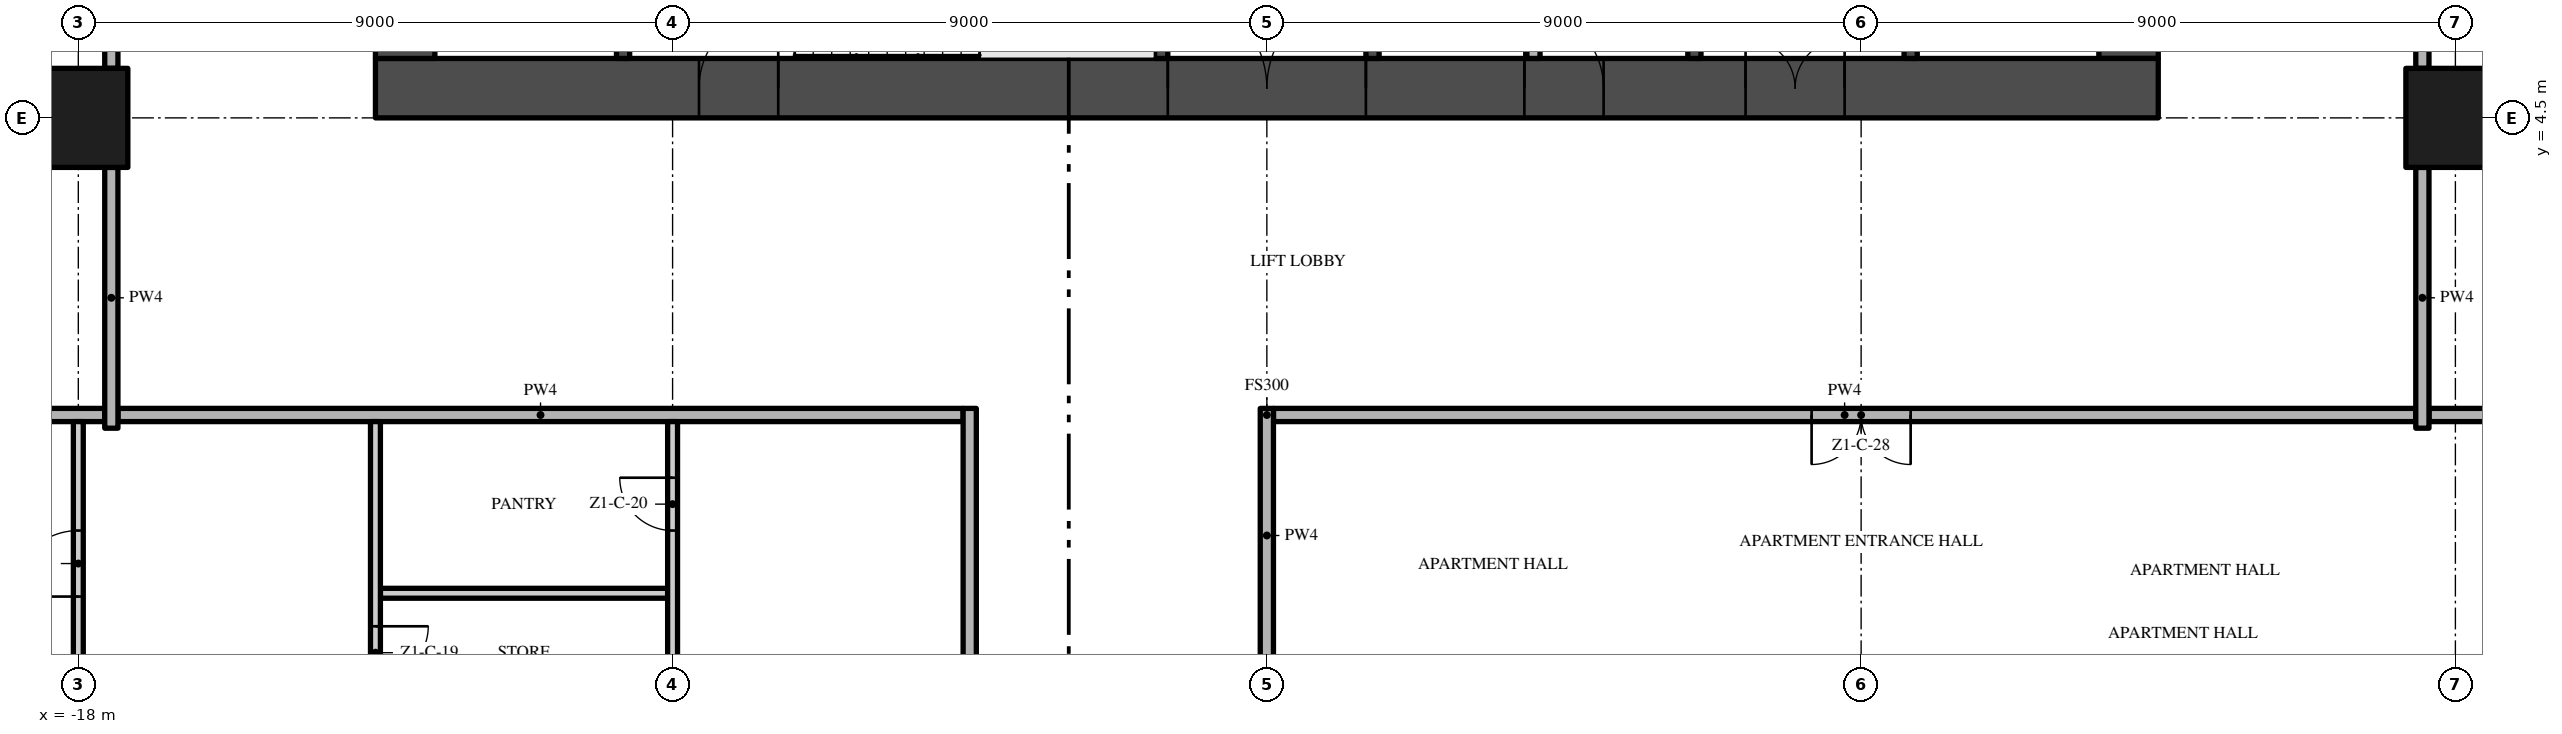
"""IFC4 building model, lengths in metres.
Left out: names, types, materials, properties, quantities, classifications, styles, units other than length and angle.
Written with IfcOpenShell. Run it as: python <this file> out.ifc"""

import sys

from ifc_helpers import new_model, si_unit, direction, frame, frame_2d, origin, origin_2d, place, context, subcontext, project, spatial, rectangle, extrude, element, fill, save


model = new_model("IFC4")
c1 = context("Model", 3, precision=1e-05, world=origin(), true_north=direction((0.0, 1.0)))
c2 = subcontext(c1, "Body", "Model", "MODEL_VIEW")
j1 = project(units=[si_unit("LENGTHUNIT", "METRE"), si_unit("PLANEANGLEUNIT", "RADIAN")], contexts=[c1])
p1 = place(None, origin())
s1 = spatial("IfcSite", under=j1, at=p1, CompositionType="ELEMENT")
p2 = place(p1, origin())
s2 = spatial("IfcBuilding", under=s1, at=p2, CompositionType="ELEMENT")
p3 = place(p2, frame((0.0, 0.0, 41.6)))
s3 = spatial("IfcBuildingStorey", under=s2, at=p3, CompositionType="ELEMENT", Elevation=41.6)
p4 = place(p3, frame((-13.5, 4.95, -0.3), z_axis=(0.0, 0.0, 1.0), x_axis=(1.0, 0.0, 0.0)))
e1 = element("IfcWall", 1, at=p4, inside=s3, PredefinedType="SHEAR", context=c2, shape_type="SweptSolid", body=[
    extrude(rectangle(XDim=27.0, YDim=0.9, at=frame_2d((13.5, 0.0))), origin(), (0.0, 0.0, 1.0), 3.8),
])
p5 = place(p4, frame((12.0, 0.0, 0.3)))
e2 = element("IfcOpeningElement", 2, at=p5, cuts=e1, PredefinedType="OPENING", context=c2, shape_type="SweptSolid", body=[
    extrude(rectangle(XDim=3.0, YDim=2.4, at=frame_2d((1.5, 1.2))), frame((0.0, 0.46, 0.0), z_axis=(0.0, -1.0, 0.0), x_axis=(1.0, 0.0, 0.0)), (0.0, 0.0, 1.0), 0.92),
])
p6 = place(p4, frame((4.9, 0.0, 0.3)))
e3 = element("IfcOpeningElement", 3, at=p6, cuts=e1, PredefinedType="OPENING", context=c2, shape_type="SweptSolid", body=[
    extrude(rectangle(XDim=1.2, YDim=2.2, at=frame_2d((0.6, 1.1))), frame((0.0, 0.46, 0.0), z_axis=(0.0, -1.0, 0.0), x_axis=(1.0, 0.0, 0.0)), (0.0, 0.0, 1.0), 0.92),
])
p7 = place(p4, frame((20.75, 0.0, 0.3)))
e4 = element("IfcOpeningElement", 4, at=p7, cuts=e1, PredefinedType="OPENING", context=c2, shape_type="SweptSolid", body=[
    extrude(rectangle(XDim=1.5, YDim=2.2, at=frame_2d((0.75, 1.1))), frame((0.0, 0.46, 0.0), z_axis=(0.0, -1.0, 0.0), x_axis=(1.0, 0.0, 0.0)), (0.0, 0.0, 1.0), 0.92),
])
p8 = place(p4, frame((17.4, 0.0, 0.3)))
e5 = element("IfcOpeningElement", 5, at=p8, cuts=e1, PredefinedType="OPENING", context=c2, shape_type="SweptSolid", body=[
    extrude(rectangle(XDim=1.2, YDim=2.2, at=frame_2d((0.6, 1.1))), frame((0.0, 0.46, 0.0), z_axis=(0.0, -1.0, 0.0), x_axis=(1.0, 0.0, 0.0)), (0.0, 0.0, 1.0), 0.92),
])
p9 = place(p3, frame((13.05, 5.4, -0.3), z_axis=(0.0, 0.0, 1.0), x_axis=(0.0, 1.0, 0.0)))
e6 = element("IfcWall", 6, at=p9, inside=s3, PredefinedType="SHEAR", context=c2, shape_type="SweptSolid", body=[
    extrude(rectangle(XDim=16.2, YDim=0.9, at=frame_2d((8.1, 0.0))), origin(), (0.0, 0.0, 1.0), 3.8),
])
p10 = place(p9, frame((6.0, 0.0, 0.3)))
e7 = element("IfcOpeningElement", 7, at=p10, cuts=e6, PredefinedType="OPENING", context=c2, shape_type="SweptSolid", body=[
    extrude(rectangle(XDim=1.2, YDim=2.2, at=frame_2d((0.6, 1.1))), frame((0.0, 0.46, 0.0), z_axis=(0.0, -1.0, 0.0), x_axis=(1.0, 0.0, 0.0)), (0.0, 0.0, 1.0), 0.92),
])
p11 = place(p3, frame((-13.05, 21.6, -0.3), z_axis=(0.0, 0.0, 1.0), x_axis=(0.0, -1.0, 0.0)))
e8 = element("IfcWall", 8, at=p11, inside=s3, PredefinedType="SHEAR", context=c2, shape_type="SweptSolid", body=[
    extrude(rectangle(XDim=16.2, YDim=0.9, at=frame_2d((8.1, 0.0))), origin(), (0.0, 0.0, 1.0), 3.8),
])
p12 = place(p11, frame((9.0, 0.0, 0.3)))
e9 = element("IfcOpeningElement", 9, at=p12, cuts=e8, PredefinedType="OPENING", context=c2, shape_type="SweptSolid", body=[
    extrude(rectangle(XDim=1.2, YDim=2.2, at=frame_2d((0.6, 1.1))), frame((0.0, 0.46, 0.0), z_axis=(0.0, -1.0, 0.0), x_axis=(1.0, 0.0, 0.0)), (0.0, 0.0, 1.0), 0.92),
])
for number, where, z_axis, x_axis in (
    (10, (-18.0, 4.5, 0.0), (0.0, 0.0, 1.0), (1.0, 0.0, 0.0)),
    (11, (18.0, 4.5, 0.0), (0.0, 0.0, 1.0), (1.0, 0.0, 0.0)),
):
    element("IfcColumn", number, at=place(p3, frame(where, z_axis=z_axis, x_axis=x_axis)), inside=s3, PredefinedType="COLUMN", context=c2, shape_type="SweptSolid", body=[
        extrude(rectangle(XDim=1.5, YDim=1.5, at=origin_2d()), origin(), (0.0, 0.0, 1.0), 3.5),
    ])
for number, where, z_axis, x_axis in (
    (12, (-9.75, 5.4, 0.0), (0.0, 0.0, 1.0), (0.0, 1.0, 0.0)),
    (13, (-1.6, 5.4, 0.0), (0.0, 0.0, 1.0), (0.0, 1.0, 0.0)),
):
    element("IfcWall", number, at=place(p3, frame(where, z_axis=z_axis, x_axis=x_axis)), inside=s3, PredefinedType="SHEAR", context=c2, shape_type="SweptSolid", body=[
        extrude(rectangle(XDim=2.55, YDim=0.2, at=frame_2d((1.275, 0.0))), origin(), (0.0, 0.0, 1.0), 3.5),
    ])
p13 = place(p3, frame((1.6, 9.8, 0.0), z_axis=(0.0, 0.0, 1.0), x_axis=(0.0, -1.0, 0.0)))
e14 = element("IfcWall", 14, at=p13, inside=s3, PredefinedType="SHEAR", context=c2, shape_type="SweptSolid", body=[
    extrude(rectangle(XDim=4.4, YDim=0.2, at=frame_2d((2.2, 0.0))), origin(), (0.0, 0.0, 1.0), 3.5),
])
p14 = place(p13, frame((1.35, 0.0, 0.0)))
e15 = element("IfcOpeningElement", 15, at=p14, cuts=e14, PredefinedType="OPENING", context=c2, shape_type="SweptSolid", body=[
    extrude(rectangle(XDim=0.9, YDim=2.1, at=frame_2d((0.45, 1.05))), frame((0.0, 0.11, 0.0), z_axis=(0.0, -1.0, 0.0), x_axis=(1.0, 0.0, 0.0)), (0.0, 0.0, 1.0), 0.22),
])
p15 = place(p3, frame((4.037, 9.8, 0.0), z_axis=(0.0, 0.0, 1.0), x_axis=(0.0, -1.0, 0.0)))
e16 = element("IfcWall", 16, at=p15, inside=s3, PredefinedType="PARTITIONING", context=c2, shape_type="SweptSolid", body=[
    extrude(rectangle(XDim=4.4, YDim=0.2, at=frame_2d((2.2, 0.0))), origin(), (0.0, 0.0, 1.0), 3.5),
])
p16 = place(p15, frame((1.75, 0.0, 0.0)))
e17 = element("IfcOpeningElement", 17, at=p16, cuts=e16, PredefinedType="OPENING", context=c2, shape_type="SweptSolid", body=[
    extrude(rectangle(XDim=0.9, YDim=2.1, at=frame_2d((0.45, 1.05))), frame((0.0, 0.11, 0.0), z_axis=(0.0, -1.0, 0.0), x_axis=(1.0, 0.0, 0.0)), (0.0, 0.0, 1.0), 0.22),
])
p17 = place(p3, frame((6.475, 5.4, 0.0), z_axis=(0.0, 0.0, 1.0), x_axis=(0.0, 1.0, 0.0)))
e18 = element("IfcWall", 18, at=p17, inside=s3, PredefinedType="SHEAR", context=c2, shape_type="SweptSolid", body=[
    extrude(rectangle(XDim=4.4, YDim=0.2, at=frame_2d((2.2, 0.0))), origin(), (0.0, 0.0, 1.0), 3.5),
])
p18 = place(p3, frame((9.75, 5.4, 0.0), z_axis=(0.0, 0.0, 1.0), x_axis=(0.0, 1.0, 0.0)))
e19 = element("IfcWall", 19, at=p18, inside=s3, PredefinedType="SHEAR", context=c2, shape_type="SweptSolid", body=[
    extrude(rectangle(XDim=2.2, YDim=0.2, at=frame_2d((1.1, 0.0))), origin(), (0.0, 0.0, 1.0), 3.5),
])
p19 = place(p18, frame((0.55, 0.0, 0.0)))
e20 = element("IfcOpeningElement", 20, at=p19, cuts=e19, PredefinedType="OPENING", context=c2, shape_type="SweptSolid", body=[
    extrude(rectangle(XDim=1.1, YDim=2.1, at=frame_2d((0.55, 1.05))), frame((0.0, 0.11, 0.0), z_axis=(0.0, -1.0, 0.0), x_axis=(1.0, 0.0, 0.0)), (0.0, 0.0, 1.0), 0.22),
])
p20 = place(p3, frame((-13.425, -2.7, 0.0), z_axis=(0.0, 0.0, 1.0), x_axis=(1.0, 0.0, 0.0)))
e21 = element("IfcWall", 21, at=p20, inside=s3, PredefinedType="PARTITIONING", context=c2, shape_type="SweptSolid", body=[
    extrude(rectangle(XDim=4.35, YDim=0.15, at=frame_2d((2.175, 0.0))), origin(), (0.0, 0.0, 1.0), 3.5),
])
p21 = place(p3, frame((-17.4, 0.0, 0.0), z_axis=(0.0, 0.0, 1.0), x_axis=(1.0, 0.0, 0.0)))
e22 = element("IfcWall", 22, at=p21, inside=s3, PredefinedType="PARTITIONING", context=c2, shape_type="SweptSolid", body=[
    extrude(rectangle(XDim=12.8, YDim=0.2, at=frame_2d((6.4, 0.0))), origin(), (0.0, 0.0, 1.0), 3.5),
])
p22 = place(p3, frame((17.4, 0.0, 0.0), z_axis=(0.0, 0.0, 1.0), x_axis=(-1.0, 0.0, 0.0)))
e23 = element("IfcWall", 23, at=p22, inside=s3, PredefinedType="PARTITIONING", context=c2, shape_type="SweptSolid", body=[
    extrude(rectangle(XDim=17.3, YDim=0.2, at=frame_2d((8.65, 0.0))), origin(), (0.0, 0.0, 1.0), 3.5),
])
p23 = place(p22, frame((7.65, 0.0, 0.0)))
e24 = element("IfcOpeningElement", 24, at=p23, cuts=e23, PredefinedType="OPENING", context=c2, shape_type="SweptSolid", body=[
    extrude(rectangle(XDim=1.5, YDim=2.4, at=frame_2d((0.75, 1.2))), frame((0.0, 0.11, 0.0), z_axis=(0.0, -1.0, 0.0), x_axis=(1.0, 0.0, 0.0)), (0.0, 0.0, 1.0), 0.22),
])
for number, where, z_axis, x_axis in (
    (25, (-26.7, 0.0, 0.0), (0.0, 0.0, 1.0), (1.0, 0.0, 0.0)),
    (26, (17.6, 0.0, 0.0), (0.0, 0.0, 1.0), (1.0, 0.0, 0.0)),
):
    element("IfcWall", number, at=place(p3, frame(where, z_axis=z_axis, x_axis=x_axis)), inside=s3, PredefinedType="PARTITIONING", context=c2, shape_type="SweptSolid", body=[
        extrude(rectangle(XDim=9.1, YDim=0.2, at=frame_2d((4.55, 0.0))), origin(), (0.0, 0.0, 1.0), 3.5),
    ])
p24 = place(p3, frame((-18.0, -3.75, 0.0), z_axis=(0.0, 0.0, 1.0), x_axis=(0.0, 1.0, 0.0)))
e27 = element("IfcWall", 27, at=p24, inside=s3, PredefinedType="PARTITIONING", context=c2, shape_type="SweptSolid", body=[
    extrude(rectangle(XDim=3.65, YDim=0.15, at=frame_2d((1.825, 0.0))), origin(), (0.0, 0.0, 1.0), 3.5),
])
p25 = place(p24, frame((1.0, 0.0, 0.0)))
e28 = element("IfcOpeningElement", 28, at=p25, cuts=e27, PredefinedType="OPENING", context=c2, shape_type="SweptSolid", body=[
    extrude(rectangle(XDim=1.0, YDim=2.4, at=frame_2d((0.5, 1.2))), frame((0.0, 0.085, 0.0), z_axis=(0.0, -1.0, 0.0), x_axis=(1.0, 0.0, 0.0)), (0.0, 0.0, 1.0), 0.17),
])
p26 = place(p3, frame((-17.5, -0.2, 0.0), z_axis=(0.0, 0.0, 1.0), x_axis=(0.0, 1.0, 0.0)))
e29 = element("IfcWall", 29, at=p26, inside=s3, PredefinedType="PARTITIONING", context=c2, shape_type="SweptSolid", body=[
    extrude(rectangle(XDim=3.95, YDim=0.2, at=frame_2d((1.975, 0.0))), origin(), (0.0, 0.0, 1.0), 3.5),
])
p27 = place(p3, frame((-17.5, 5.25, 0.0), z_axis=(0.0, 0.0, 1.0), x_axis=(0.0, 1.0, 0.0)))
e30 = element("IfcWall", 30, at=p27, inside=s3, PredefinedType="PARTITIONING", context=c2, shape_type="SweptSolid", body=[
    extrude(rectangle(XDim=7.5, YDim=0.2, at=frame_2d((3.75, 0.0))), origin(), (0.0, 0.0, 1.0), 3.5),
])
p28 = place(p27, frame((3.15, 0.0, 0.0)))
e31 = element("IfcOpeningElement", 31, at=p28, cuts=e30, PredefinedType="OPENING", context=c2, shape_type="SweptSolid", body=[
    extrude(rectangle(XDim=1.2, YDim=2.4, at=frame_2d((0.6, 1.2))), frame((0.0, 0.11, 0.0), z_axis=(0.0, -1.0, 0.0), x_axis=(1.0, 0.0, 0.0)), (0.0, 0.0, 1.0), 0.22),
])
p29 = place(p3, frame((-13.5, -0.1, 0.0), z_axis=(0.0, 0.0, 1.0), x_axis=(0.0, -1.0, 0.0)))
e32 = element("IfcWall", 32, at=p29, inside=s3, PredefinedType="PARTITIONING", context=c2, shape_type="SweptSolid", body=[
    extrude(rectangle(XDim=7.475, YDim=0.15, at=frame_2d((3.737, 0.0))), origin(), (0.0, 0.0, 1.0), 3.5),
])
p30 = place(p29, frame((3.1, 0.0, 0.0)))
e33 = element("IfcOpeningElement", 33, at=p30, cuts=e32, PredefinedType="OPENING", context=c2, shape_type="SweptSolid", body=[
    extrude(rectangle(XDim=0.8, YDim=2.0, at=frame_2d((0.4, 1.0))), frame((0.0, 0.085, 0.0), z_axis=(0.0, -1.0, 0.0), x_axis=(1.0, 0.0, 0.0)), (0.0, 0.0, 1.0), 0.17),
])
p31 = place(p3, frame((-9.0, -3.75, 0.0), z_axis=(0.0, 0.0, 1.0), x_axis=(0.0, 1.0, 0.0)))
e34 = element("IfcWall", 34, at=p31, inside=s3, PredefinedType="PARTITIONING", context=c2, shape_type="SweptSolid", body=[
    extrude(rectangle(XDim=3.65, YDim=0.15, at=frame_2d((1.825, 0.0))), origin(), (0.0, 0.0, 1.0), 3.5),
])
p32 = place(p31, frame((2.0, 0.0, 0.0)))
e35 = element("IfcOpeningElement", 35, at=p32, cuts=e34, PredefinedType="OPENING", context=c2, shape_type="SweptSolid", body=[
    extrude(rectangle(XDim=0.8, YDim=2.0, at=frame_2d((0.4, 1.0))), frame((0.0, 0.085, 0.0), z_axis=(0.0, -1.0, 0.0), x_axis=(1.0, 0.0, 0.0)), (0.0, 0.0, 1.0), 0.17),
])
p33 = place(p3, frame((-4.5, -22.2, 0.0), z_axis=(0.0, 0.0, 1.0), x_axis=(0.0, 1.0, 0.0)))
e36 = element("IfcWall", 36, at=p33, inside=s3, PredefinedType="PARTITIONING", context=c2, shape_type="SweptSolid", body=[
    extrude(rectangle(XDim=22.3, YDim=0.2, at=frame_2d((11.15, 0.0))), origin(), (0.0, 0.0, 1.0), 3.5),
])
p34 = place(p33, frame((10.2, 0.0, 0.0)))
e37 = element("IfcOpeningElement", 37, at=p34, cuts=e36, PredefinedType="OPENING", context=c2, shape_type="SweptSolid", body=[
    extrude(rectangle(XDim=1.5, YDim=2.4, at=frame_2d((0.75, 1.2))), frame((0.0, 0.11, 0.0), z_axis=(0.0, -1.0, 0.0), x_axis=(1.0, 0.0, 0.0)), (0.0, 0.0, 1.0), 0.22),
])
p35 = place(p3, frame((0.0, -3.75, 0.0), z_axis=(0.0, 0.0, 1.0), x_axis=(0.0, 1.0, 0.0)))
e38 = element("IfcWall", 38, at=p35, inside=s3, PredefinedType="PARTITIONING", context=c2, shape_type="SweptSolid", body=[
    extrude(rectangle(XDim=3.85, YDim=0.2, at=frame_2d((1.925, 0.0))), origin(), (0.0, 0.0, 1.0), 3.5),
])
p36 = place(p3, frame((17.5, -0.2, 0.0), z_axis=(0.0, 0.0, 1.0), x_axis=(0.0, 1.0, 0.0)))
e39 = element("IfcWall", 39, at=p36, inside=s3, PredefinedType="PARTITIONING", context=c2, shape_type="SweptSolid", body=[
    extrude(rectangle(XDim=3.95, YDim=0.2, at=frame_2d((1.975, 0.0))), origin(), (0.0, 0.0, 1.0), 3.5),
])
p37 = place(p3, frame((17.5, 12.75, 0.0), z_axis=(0.0, 0.0, 1.0), x_axis=(0.0, -1.0, 0.0)))
e40 = element("IfcWall", 40, at=p37, inside=s3, PredefinedType="PARTITIONING", context=c2, shape_type="SweptSolid", body=[
    extrude(rectangle(XDim=7.5, YDim=0.2, at=frame_2d((3.75, 0.0))), origin(), (0.0, 0.0, 1.0), 3.5),
])
p38 = place(p37, frame((3.15, 0.0, 0.0)))
e41 = element("IfcOpeningElement", 41, at=p38, cuts=e40, PredefinedType="OPENING", context=c2, shape_type="SweptSolid", body=[
    extrude(rectangle(XDim=1.2, YDim=2.4, at=frame_2d((0.6, 1.2))), frame((0.0, 0.11, 0.0), z_axis=(0.0, -1.0, 0.0), x_axis=(1.0, 0.0, 0.0)), (0.0, 0.0, 1.0), 0.22),
])
p39 = place(p5, frame((3.0, 0.0, 0.0), z_axis=(0.0, 0.0, 1.0), x_axis=(-1.0, 0.0, 0.0)))
e42 = element("IfcDoor", 42, at=p39, inside=s3, OperationType="DOUBLE_DOOR_SINGLE_SWING", PredefinedType="DOOR", context=c2, shape_type="SweptSolid", body=[
    extrude(rectangle(XDim=3.0, YDim=2.4, at=frame_2d((1.5, 1.2))), frame((0.0, 0.025, 0.0), z_axis=(0.0, -1.0, 0.0), x_axis=(1.0, 0.0, 0.0)), (0.0, 0.0, 1.0), 0.05),
])
fill(e2, e42)
p40 = place(p6, frame((1.2, 0.0, 0.0), z_axis=(0.0, 0.0, 1.0), x_axis=(-1.0, 0.0, 0.0)))
e43 = element("IfcDoor", 43, at=p40, inside=s3, OperationType="SINGLE_SWING_LEFT", PredefinedType="DOOR", context=c2, shape_type="SweptSolid", body=[
    extrude(rectangle(XDim=1.2, YDim=2.2, at=frame_2d((0.6, 1.1))), frame((0.0, 0.025, 0.0), z_axis=(0.0, -1.0, 0.0), x_axis=(1.0, 0.0, 0.0)), (0.0, 0.0, 1.0), 0.05),
])
fill(e3, e43)
p41 = place(p7, frame((1.5, 0.0, 0.0), z_axis=(0.0, 0.0, 1.0), x_axis=(-1.0, 0.0, 0.0)))
e44 = element("IfcDoor", 44, at=p41, inside=s3, OperationType="DOUBLE_DOOR_SINGLE_SWING", PredefinedType="DOOR", context=c2, shape_type="SweptSolid", body=[
    extrude(rectangle(XDim=1.5, YDim=2.2, at=frame_2d((0.75, 1.1))), frame((0.0, 0.025, 0.0), z_axis=(0.0, -1.0, 0.0), x_axis=(1.0, 0.0, 0.0)), (0.0, 0.0, 1.0), 0.05),
])
fill(e4, e44)
p42 = place(p8, frame((1.2, 0.0, 0.0), z_axis=(0.0, 0.0, 1.0), x_axis=(-1.0, 0.0, 0.0)))
e45 = element("IfcDoor", 45, at=p42, inside=s3, OperationType="SINGLE_SWING_RIGHT", PredefinedType="DOOR", context=c2, shape_type="SweptSolid", body=[
    extrude(rectangle(XDim=1.2, YDim=2.2, at=frame_2d((0.6, 1.1))), frame((0.0, 0.025, 0.0), z_axis=(0.0, -1.0, 0.0), x_axis=(1.0, 0.0, 0.0)), (0.0, 0.0, 1.0), 0.05),
])
fill(e5, e45)
p43 = place(p30, origin())
e46 = element("IfcDoor", 46, at=p43, inside=s3, OperationType="SINGLE_SWING_LEFT", PredefinedType="DOOR", context=c2, shape_type="SweptSolid", body=[
    extrude(rectangle(XDim=0.8, YDim=2.0, at=frame_2d((0.4, 1.0))), frame((0.0, 0.025, 0.0), z_axis=(0.0, -1.0, 0.0), x_axis=(1.0, 0.0, 0.0)), (0.0, 0.0, 1.0), 0.05),
])
fill(e33, e46)
p44 = place(p32, origin())
e47 = element("IfcDoor", 47, at=p44, inside=s3, OperationType="SINGLE_SWING_RIGHT", PredefinedType="DOOR", context=c2, shape_type="SweptSolid", body=[
    extrude(rectangle(XDim=0.8, YDim=2.0, at=frame_2d((0.4, 1.0))), frame((0.0, 0.025, 0.0), z_axis=(0.0, -1.0, 0.0), x_axis=(1.0, 0.0, 0.0)), (0.0, 0.0, 1.0), 0.05),
])
fill(e35, e47)
p45 = place(p25, origin())
e48 = element("IfcDoor", 48, at=p45, inside=s3, OperationType="SINGLE_SWING_LEFT", PredefinedType="DOOR", context=c2, shape_type="SweptSolid", body=[
    extrude(rectangle(XDim=1.0, YDim=2.4, at=frame_2d((0.5, 1.2))), frame((0.0, 0.025, 0.0), z_axis=(0.0, -1.0, 0.0), x_axis=(1.0, 0.0, 0.0)), (0.0, 0.0, 1.0), 0.05),
])
fill(e28, e48)
p46 = place(p23, origin())
e49 = element("IfcDoor", 49, at=p46, inside=s3, OperationType="DOUBLE_DOOR_SINGLE_SWING", PredefinedType="DOOR", context=c2, shape_type="SweptSolid", body=[
    extrude(rectangle(XDim=1.5, YDim=2.4, at=frame_2d((0.75, 1.2))), frame((0.0, 0.025, 0.0), z_axis=(0.0, -1.0, 0.0), x_axis=(1.0, 0.0, 0.0)), (0.0, 0.0, 1.0), 0.05),
])
fill(e24, e49)
save(model, sys.argv[1])
